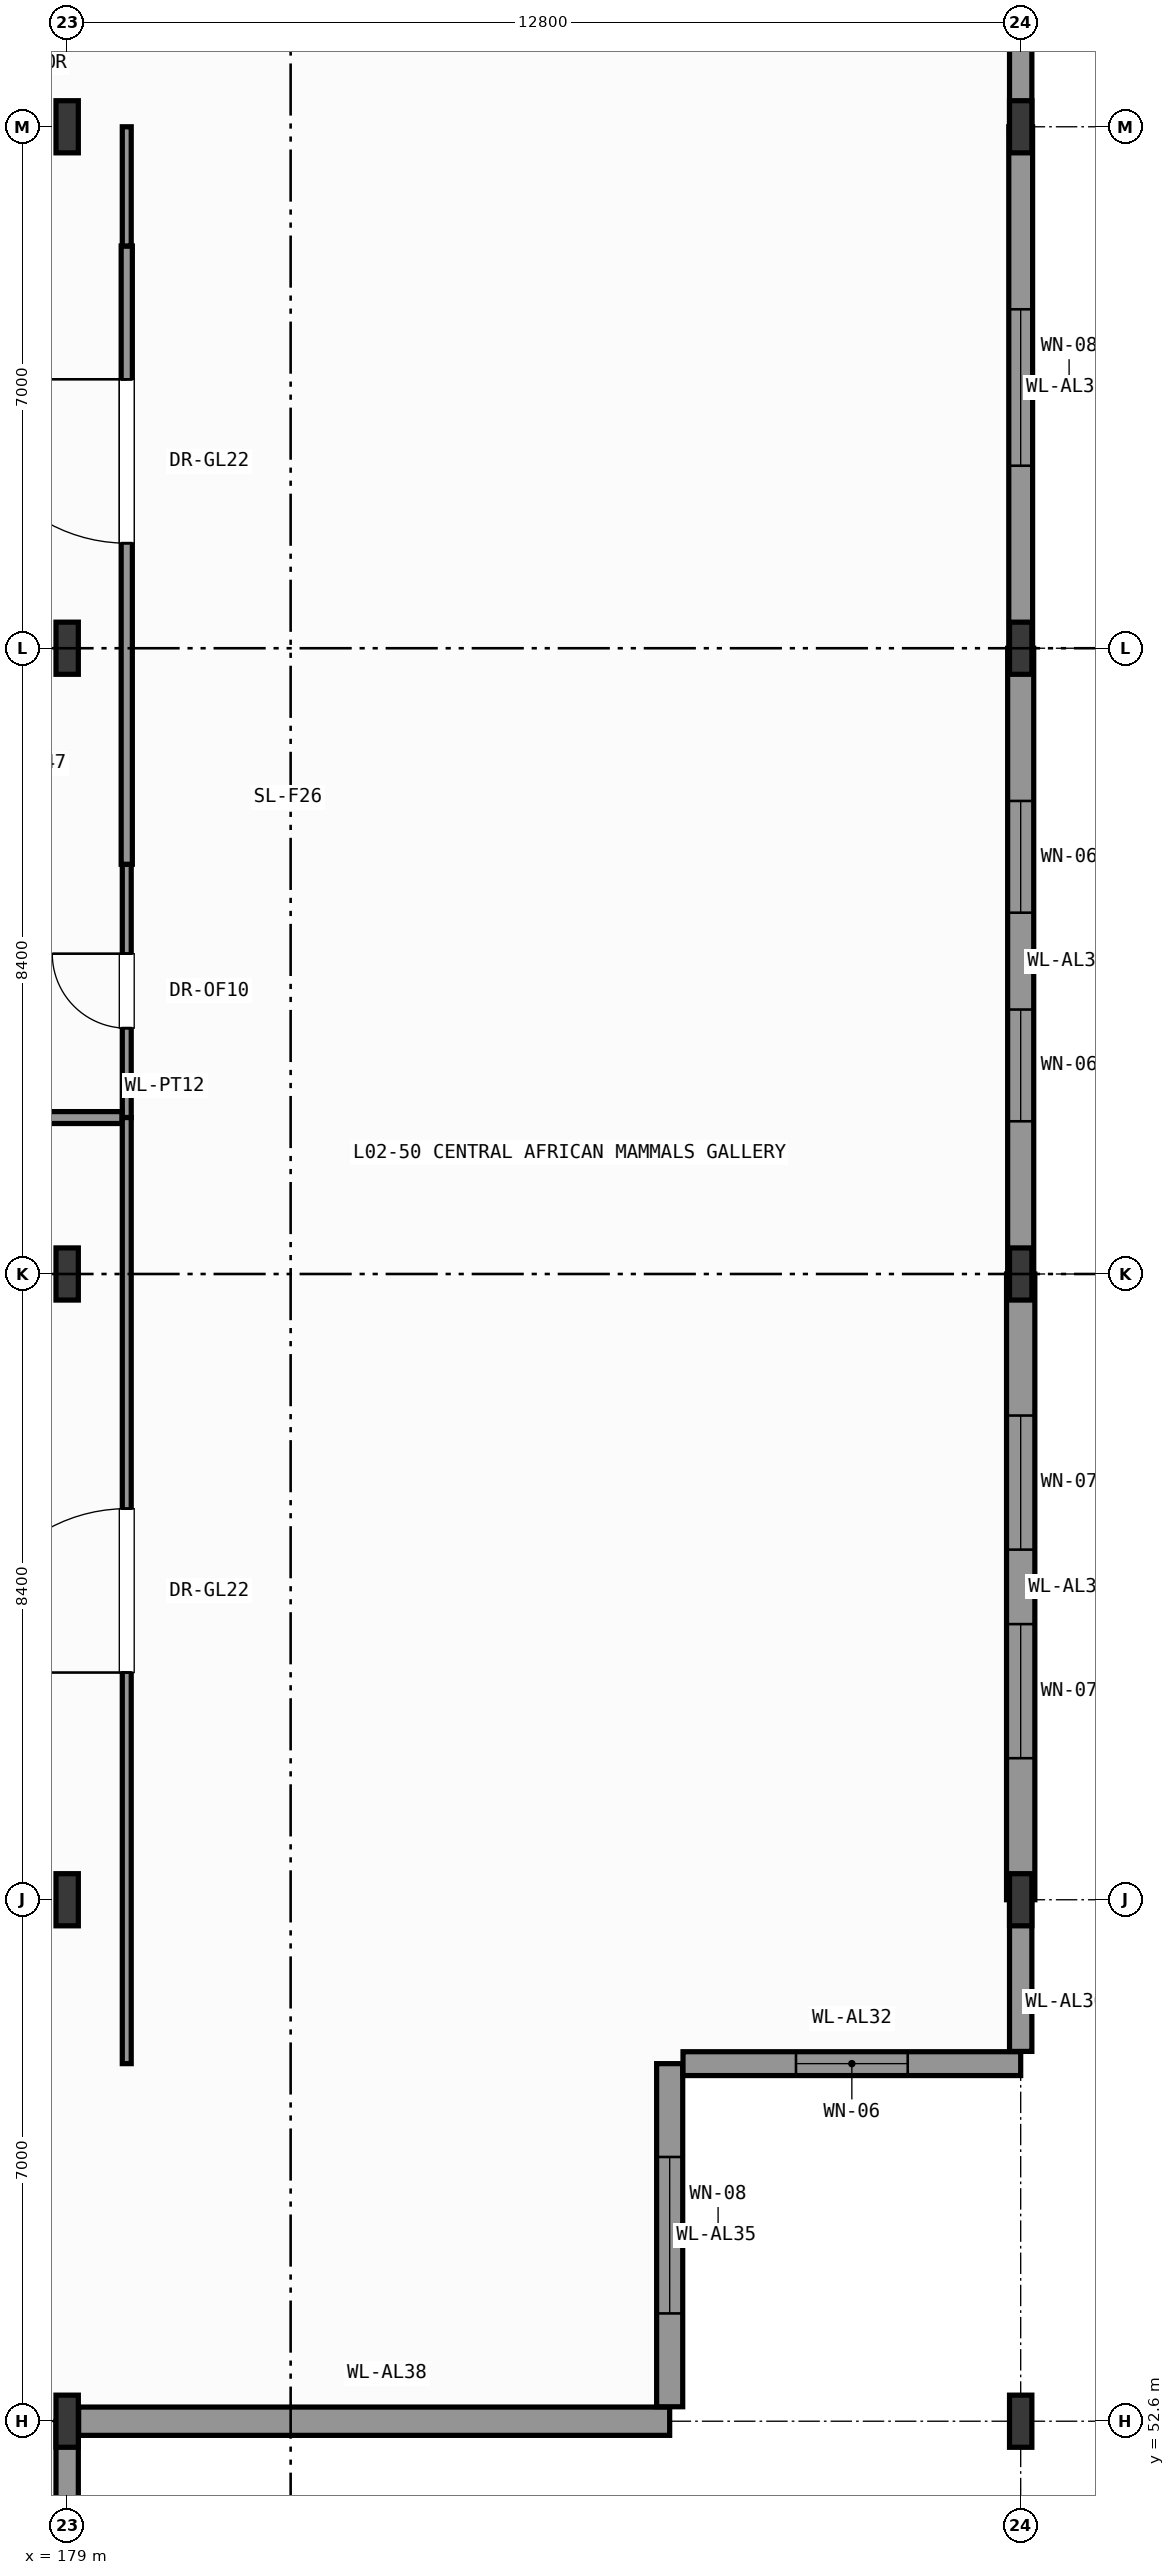
"""IFC4 building model, lengths in metres.
Left out: names, types, materials, properties, quantities, classifications, styles, units other than length and angle.
Written with IfcOpenShell. Run it as: python <this file> out.ifc"""

import sys

from ifc_helpers import new_model, si_unit, direction, frame, frame_2d, origin, origin_2d, place, context, subcontext, project, spatial, rectangle, i_section, extrude, element, fill, save


model = new_model("IFC4")
c1 = context("Model", 3, precision=1e-05, world=origin(), true_north=direction((0.0, 1.0)))
c2 = subcontext(c1, "Body", "Model", "MODEL_VIEW")
j1 = project(units=[si_unit("LENGTHUNIT", "METRE"), si_unit("PLANEANGLEUNIT", "RADIAN")], contexts=[c1])
p1 = place(None, origin())
s1 = spatial("IfcSite", under=j1, at=p1, CompositionType="ELEMENT")
p2 = place(p1, origin())
s2 = spatial("IfcBuilding", under=s1, at=p2, CompositionType="ELEMENT")
p3 = place(p2, frame((0.0, 0.0, 7.8)))
s3 = spatial("IfcBuildingStorey", under=s2, at=p3, CompositionType="ELEMENT", Elevation=7.8)
for number, where, z_axis, x_axis in (
    (1, (179.0, 52.6, 0.0), (0.0, 0.0, 1.0), (1.0, 0.0, 0.0)),
    (2, (179.0, 59.6, 0.0), (0.0, 0.0, 1.0), (1.0, 0.0, 0.0)),
    (3, (179.0, 68.0, 0.0), (0.0, 0.0, 1.0), (1.0, 0.0, 0.0)),
    (4, (179.0, 76.4, 0.0), (0.0, 0.0, 1.0), (1.0, 0.0, 0.0)),
    (5, (179.0, 83.4, 0.0), (0.0, 0.0, 1.0), (1.0, 0.0, 0.0)),
    (6, (191.8, 52.6, 0.0), (0.0, 0.0, 1.0), (1.0, 0.0, 0.0)),
    (7, (191.8, 59.6, 0.0), (0.0, 0.0, 1.0), (1.0, 0.0, 0.0)),
    (8, (191.8, 68.0, 0.0), (0.0, 0.0, 1.0), (1.0, 0.0, 0.0)),
    (9, (191.8, 76.4, 0.0), (0.0, 0.0, 1.0), (1.0, 0.0, 0.0)),
    (10, (191.8, 83.4, 0.0), (0.0, 0.0, 1.0), (1.0, 0.0, 0.0)),
):
    element("IfcColumn", number, at=place(p3, frame(where, z_axis=z_axis, x_axis=x_axis)), inside=s3, PredefinedType="COLUMN", context=c2, shape_type="SweptSolid", body=[
        extrude(i_section(OverallWidth=0.3, OverallDepth=0.7, WebThickness=0.017, FlangeThickness=0.032, FilletRadius=0.027, at=origin_2d()), origin(), (0.0, 0.0, 1.0), 5.4),
    ])
p4 = place(p3, frame((179.0, 52.6, 0.0), z_axis=(0.0, 0.0, 1.0), x_axis=(0.0, -1.0, 0.0)))
e11 = element("IfcWall", 11, at=p4, inside=s3, PredefinedType="SOLIDWALL", context=c2, shape_type="SweptSolid", body=[
    extrude(rectangle(XDim=7.0, YDim=0.3, at=frame_2d((3.5, 0.0))), origin(), (0.0, 0.0, 1.0), 4.605),
])
p5 = place(p4, frame((1.583, 0.0, 0.95)))
e12 = element("IfcOpeningElement", 12, at=p5, cuts=e11, PredefinedType="OPENING", context=c2, shape_type="SweptSolid", body=[
    extrude(rectangle(XDim=1.5, YDim=2.4, at=frame_2d((0.75, 1.2))), frame((0.0, 0.16, 0.0), z_axis=(0.0, -1.0, 0.0), x_axis=(1.0, 0.0, 0.0)), (0.0, 0.0, 1.0), 0.32),
])
p6 = place(p4, frame((3.917, 0.0, 0.95)))
e13 = element("IfcOpeningElement", 13, at=p6, cuts=e11, PredefinedType="OPENING", context=c2, shape_type="SweptSolid", body=[
    extrude(rectangle(XDim=1.5, YDim=2.4, at=frame_2d((0.75, 1.2))), frame((0.0, 0.16, 0.0), z_axis=(0.0, -1.0, 0.0), x_axis=(1.0, 0.0, 0.0)), (0.0, 0.0, 1.0), 0.32),
])
p7 = place(p3, frame((187.088, 52.6, 0.0), z_axis=(0.0, 0.0, 1.0), x_axis=(-1.0, 0.0, 0.0)))
e14 = element("IfcWall", 14, at=p7, inside=s3, PredefinedType="SOLIDWALL", context=c2, shape_type="SweptSolid", body=[
    extrude(rectangle(XDim=7.934, YDim=0.38, at=frame_2d((3.967, 0.0))), origin(), (0.0, 0.0, 1.0), 3.705),
])
p8 = place(p3, frame((187.088, 57.4, 0.0), z_axis=(0.0, 0.0, 1.0), x_axis=(0.0, -1.0, 0.0)))
e15 = element("IfcWall", 15, at=p8, inside=s3, PredefinedType="SOLIDWALL", context=c2, shape_type="SweptSolid", body=[
    extrude(rectangle(XDim=4.606, YDim=0.35, at=frame_2d((2.303, 0.0))), origin(), (0.0, 0.0, 1.0), 5.15),
])
p9 = place(p8, frame((1.253, 0.0, 0.95)))
e16 = element("IfcOpeningElement", 16, at=p9, cuts=e15, PredefinedType="OPENING", context=c2, shape_type="SweptSolid", body=[
    extrude(rectangle(XDim=2.1, YDim=2.8, at=frame_2d((1.05, 1.4))), frame((0.0, 0.185, 0.0), z_axis=(0.0, -1.0, 0.0), x_axis=(1.0, 0.0, 0.0)), (0.0, 0.0, 1.0), 0.37),
])
p10 = place(p3, frame((191.8, 57.4, 0.0), z_axis=(0.0, 0.0, 1.0), x_axis=(-1.0, 0.0, 0.0)))
e17 = element("IfcWall", 17, at=p10, inside=s3, PredefinedType="SOLIDWALL", context=c2, shape_type="SweptSolid", body=[
    extrude(rectangle(XDim=4.533, YDim=0.32, at=frame_2d((2.267, 0.0))), origin(), (0.0, 0.0, 1.0), 5.15),
])
p11 = place(p10, frame((1.517, 0.0, 0.95)))
e18 = element("IfcOpeningElement", 18, at=p11, cuts=e17, PredefinedType="OPENING", context=c2, shape_type="SweptSolid", body=[
    extrude(rectangle(XDim=1.5, YDim=2.4, at=frame_2d((0.75, 1.2))), frame((0.0, 0.17, 0.0), z_axis=(0.0, -1.0, 0.0), x_axis=(1.0, 0.0, 0.0)), (0.0, 0.0, 1.0), 0.34),
])
p12 = place(p3, frame((191.8, 59.6, 0.0), z_axis=(0.0, 0.0, 1.0), x_axis=(0.0, -1.0, 0.0)))
e19 = element("IfcWall", 19, at=p12, inside=s3, PredefinedType="SOLIDWALL", context=c2, shape_type="SweptSolid", body=[
    extrude(rectangle(XDim=2.036, YDim=0.3, at=frame_2d((1.018, 0.0))), origin(), (0.0, 0.0, 1.0), 4.815),
])
p13 = place(p3, frame((191.8, 68.0, 0.0), z_axis=(0.0, 0.0, 1.0), x_axis=(0.0, -1.0, 0.0)))
e20 = element("IfcWall", 20, at=p13, inside=s3, PredefinedType="SOLIDWALL", context=c2, shape_type="SweptSolid", body=[
    extrude(rectangle(XDim=8.4, YDim=0.38, at=frame_2d((4.2, 0.0))), origin(), (0.0, 0.0, 1.0), 4.665),
])
p14 = place(p13, frame((1.9, 0.0, 0.95)))
e21 = element("IfcOpeningElement", 21, at=p14, cuts=e20, PredefinedType="OPENING", context=c2, shape_type="SweptSolid", body=[
    extrude(rectangle(XDim=1.8, YDim=2.6, at=frame_2d((0.9, 1.3))), frame((0.0, 0.2, 0.0), z_axis=(0.0, -1.0, 0.0), x_axis=(1.0, 0.0, 0.0)), (0.0, 0.0, 1.0), 0.4),
])
p15 = place(p13, frame((4.7, 0.0, 0.95)))
e22 = element("IfcOpeningElement", 22, at=p15, cuts=e20, PredefinedType="OPENING", context=c2, shape_type="SweptSolid", body=[
    extrude(rectangle(XDim=1.8, YDim=2.6, at=frame_2d((0.9, 1.3))), frame((0.0, 0.2, 0.0), z_axis=(0.0, -1.0, 0.0), x_axis=(1.0, 0.0, 0.0)), (0.0, 0.0, 1.0), 0.4),
])
p16 = place(p3, frame((191.8, 76.4, 0.0), z_axis=(0.0, 0.0, 1.0), x_axis=(0.0, -1.0, 0.0)))
e23 = element("IfcWall", 23, at=p16, inside=s3, PredefinedType="SOLIDWALL", context=c2, shape_type="SweptSolid", body=[
    extrude(rectangle(XDim=8.4, YDim=0.35, at=frame_2d((4.2, 0.0))), origin(), (0.0, 0.0, 1.0), 4.665),
])
p17 = place(p16, frame((2.05, 0.0, 0.95)))
e24 = element("IfcOpeningElement", 24, at=p17, cuts=e23, PredefinedType="OPENING", context=c2, shape_type="SweptSolid", body=[
    extrude(rectangle(XDim=1.5, YDim=2.4, at=frame_2d((0.75, 1.2))), frame((0.0, 0.185, 0.0), z_axis=(0.0, -1.0, 0.0), x_axis=(1.0, 0.0, 0.0)), (0.0, 0.0, 1.0), 0.37),
])
p18 = place(p16, frame((4.85, 0.0, 0.95)))
e25 = element("IfcOpeningElement", 25, at=p18, cuts=e23, PredefinedType="OPENING", context=c2, shape_type="SweptSolid", body=[
    extrude(rectangle(XDim=1.5, YDim=2.4, at=frame_2d((0.75, 1.2))), frame((0.0, 0.185, 0.0), z_axis=(0.0, -1.0, 0.0), x_axis=(1.0, 0.0, 0.0)), (0.0, 0.0, 1.0), 0.37),
])
p19 = place(p3, frame((191.8, 83.4, 0.0), z_axis=(0.0, 0.0, 1.0), x_axis=(0.0, -1.0, 0.0)))
e26 = element("IfcWall", 26, at=p19, inside=s3, PredefinedType="SOLIDWALL", context=c2, shape_type="SweptSolid", body=[
    extrude(rectangle(XDim=7.0, YDim=0.32, at=frame_2d((3.5, 0.0))), origin(), (0.0, 0.0, 1.0), 4.815),
])
p20 = place(p19, frame((2.45, 0.0, 0.95)))
e27 = element("IfcOpeningElement", 27, at=p20, cuts=e26, PredefinedType="OPENING", context=c2, shape_type="SweptSolid", body=[
    extrude(rectangle(XDim=2.1, YDim=2.8, at=frame_2d((1.05, 1.4))), frame((0.0, 0.17, 0.0), z_axis=(0.0, -1.0, 0.0), x_axis=(1.0, 0.0, 0.0)), (0.0, 0.0, 1.0), 0.34),
])
p21 = place(p3, frame((191.8, 90.4, 0.0), z_axis=(0.0, 0.0, 1.0), x_axis=(0.0, -1.0, 0.0)))
e28 = element("IfcWall", 28, at=p21, inside=s3, PredefinedType="SOLIDWALL", context=c2, shape_type="SweptSolid", body=[
    extrude(rectangle(XDim=7.0, YDim=0.3, at=frame_2d((3.5, 0.0))), origin(), (0.0, 0.0, 1.0), 4.815),
])
p22 = place(p21, frame((1.583, 0.0, 0.95)))
e29 = element("IfcOpeningElement", 29, at=p22, cuts=e28, PredefinedType="OPENING", context=c2, shape_type="SweptSolid", body=[
    extrude(rectangle(XDim=1.5, YDim=2.4, at=frame_2d((0.75, 1.2))), frame((0.0, 0.16, 0.0), z_axis=(0.0, -1.0, 0.0), x_axis=(1.0, 0.0, 0.0)), (0.0, 0.0, 1.0), 0.32),
])
p23 = place(p21, frame((3.917, 0.0, 0.95)))
e30 = element("IfcOpeningElement", 30, at=p23, cuts=e28, PredefinedType="OPENING", context=c2, shape_type="SweptSolid", body=[
    extrude(rectangle(XDim=1.5, YDim=2.4, at=frame_2d((0.75, 1.2))), frame((0.0, 0.16, 0.0), z_axis=(0.0, -1.0, 0.0), x_axis=(1.0, 0.0, 0.0)), (0.0, 0.0, 1.0), 0.32),
])
p24 = place(p3, frame((179.8, 70.1, 0.0), z_axis=(0.0, 0.0, 1.0), x_axis=(0.0, 1.0, 0.0)))
e31 = element("IfcWall", 31, at=p24, inside=s3, PredefinedType="PARTITIONING", context=c2, shape_type="SweptSolid", body=[
    extrude(rectangle(XDim=3.4, YDim=0.12, at=frame_2d((1.7, 0.0))), origin(), (0.0, 0.0, 1.0), 5.15),
])
p25 = place(p24, frame((1.2, 0.0, 0.0)))
e32 = element("IfcOpeningElement", 32, at=p25, cuts=e31, PredefinedType="OPENING", context=c2, shape_type="SweptSolid", body=[
    extrude(rectangle(XDim=1.0, YDim=2.15, at=frame_2d((0.5, 1.075))), frame((0.0, 0.07, 0.0), z_axis=(0.0, -1.0, 0.0), x_axis=(1.0, 0.0, 0.0)), (0.0, 0.0, 1.0), 0.14),
])
p26 = place(p3, frame((170.479, 70.1, 0.0), z_axis=(0.0, 0.0, 1.0), x_axis=(1.0, 0.0, 0.0)))
e33 = element("IfcWall", 33, at=p26, inside=s3, PredefinedType="PARTITIONING", context=c2, shape_type="SweptSolid", body=[
    extrude(rectangle(XDim=9.257, YDim=0.16, at=frame_2d((4.628, 0.0))), origin(), (0.0, 0.0, 1.0), 5.15),
])
p27 = place(p26, frame((3.529, 0.0, 0.0)))
e34 = element("IfcOpeningElement", 34, at=p27, cuts=e33, PredefinedType="OPENING", context=c2, shape_type="SweptSolid", body=[
    extrude(rectangle(XDim=2.2, YDim=2.6, at=frame_2d((1.1, 1.3))), frame((0.0, 0.09, 0.0), z_axis=(0.0, -1.0, 0.0), x_axis=(1.0, 0.0, 0.0)), (0.0, 0.0, 1.0), 0.18),
])
p28 = place(p3, frame((179.8, 73.5, 0.0), z_axis=(0.0, 0.0, 1.0), x_axis=(0.0, 1.0, 0.0)))
e35 = element("IfcWall", 35, at=p28, inside=s3, PredefinedType="PARTITIONING", context=c2, shape_type="SweptSolid", body=[
    extrude(rectangle(XDim=8.3, YDim=0.15, at=frame_2d((4.15, 0.0))), origin(), (0.0, 0.0, 1.0), 5.15),
])
p29 = place(p28, frame((4.31, 0.0, 0.0)))
e36 = element("IfcOpeningElement", 36, at=p29, cuts=e35, PredefinedType="OPENING", context=c2, shape_type="SweptSolid", body=[
    extrude(rectangle(XDim=2.2, YDim=2.6, at=frame_2d((1.1, 1.3))), frame((0.0, 0.085, 0.0), z_axis=(0.0, -1.0, 0.0), x_axis=(1.0, 0.0, 0.0)), (0.0, 0.0, 1.0), 0.17),
])
p30 = place(p3, frame((179.8, 81.8, 0.0), z_axis=(0.0, 0.0, 1.0), x_axis=(0.0, 1.0, 0.0)))
e37 = element("IfcWall", 37, at=p30, inside=s3, PredefinedType="PARTITIONING", context=c2, shape_type="SweptSolid", body=[
    extrude(rectangle(XDim=1.6, YDim=0.12, at=frame_2d((0.8, 0.0))), origin(), (0.0, 0.0, 1.0), 5.15),
])
p31 = place(p3, frame((179.8, 57.4, 0.0), z_axis=(0.0, 0.0, 1.0), x_axis=(0.0, 1.0, 0.0)))
e38 = element("IfcWall", 38, at=p31, inside=s3, PredefinedType="PARTITIONING", context=c2, shape_type="SweptSolid", body=[
    extrude(rectangle(XDim=12.7, YDim=0.12, at=frame_2d((6.35, 0.0))), origin(), (0.0, 0.0, 1.0), 5.15),
])
p32 = place(p31, frame((5.25, 0.0, 0.0)))
e39 = element("IfcOpeningElement", 39, at=p32, cuts=e38, PredefinedType="OPENING", context=c2, shape_type="SweptSolid", body=[
    extrude(rectangle(XDim=2.2, YDim=2.6, at=frame_2d((1.1, 1.3))), frame((0.0, 0.07, 0.0), z_axis=(0.0, -1.0, 0.0), x_axis=(1.0, 0.0, 0.0)), (0.0, 0.0, 1.0), 0.14),
])
p33 = place(p9, origin())
e40 = element("IfcWindow", 40, at=p33, inside=s3, PartitioningType="SINGLE_PANEL", PredefinedType="WINDOW", context=c2, shape_type="SweptSolid", body=[
    extrude(rectangle(XDim=2.1, YDim=2.8, at=frame_2d((1.05, 1.4))), frame((0.0, 0.03, 0.0), z_axis=(0.0, -1.0, 0.0), x_axis=(1.0, 0.0, 0.0)), (0.0, 0.0, 1.0), 0.06),
])
fill(e16, e40)
p34 = place(p11, origin())
e41 = element("IfcWindow", 41, at=p34, inside=s3, PartitioningType="SINGLE_PANEL", PredefinedType="WINDOW", context=c2, shape_type="SweptSolid", body=[
    extrude(rectangle(XDim=1.5, YDim=2.4, at=frame_2d((0.75, 1.2))), frame((0.0, 0.03, 0.0), z_axis=(0.0, -1.0, 0.0), x_axis=(1.0, 0.0, 0.0)), (0.0, 0.0, 1.0), 0.06),
])
fill(e18, e41)
p35 = place(p14, origin())
e42 = element("IfcWindow", 42, at=p35, inside=s3, PartitioningType="SINGLE_PANEL", PredefinedType="WINDOW", context=c2, shape_type="SweptSolid", body=[
    extrude(rectangle(XDim=1.8, YDim=2.6, at=frame_2d((0.9, 1.3))), frame((0.0, 0.03, 0.0), z_axis=(0.0, -1.0, 0.0), x_axis=(1.0, 0.0, 0.0)), (0.0, 0.0, 1.0), 0.06),
])
fill(e21, e42)
p36 = place(p15, origin())
e43 = element("IfcWindow", 43, at=p36, inside=s3, PartitioningType="SINGLE_PANEL", PredefinedType="WINDOW", context=c2, shape_type="SweptSolid", body=[
    extrude(rectangle(XDim=1.8, YDim=2.6, at=frame_2d((0.9, 1.3))), frame((0.0, 0.03, 0.0), z_axis=(0.0, -1.0, 0.0), x_axis=(1.0, 0.0, 0.0)), (0.0, 0.0, 1.0), 0.06),
])
fill(e22, e43)
p37 = place(p17, origin())
e44 = element("IfcWindow", 44, at=p37, inside=s3, PartitioningType="SINGLE_PANEL", PredefinedType="WINDOW", context=c2, shape_type="SweptSolid", body=[
    extrude(rectangle(XDim=1.5, YDim=2.4, at=frame_2d((0.75, 1.2))), frame((0.0, 0.03, 0.0), z_axis=(0.0, -1.0, 0.0), x_axis=(1.0, 0.0, 0.0)), (0.0, 0.0, 1.0), 0.06),
])
fill(e24, e44)
p38 = place(p18, origin())
e45 = element("IfcWindow", 45, at=p38, inside=s3, PartitioningType="SINGLE_PANEL", PredefinedType="WINDOW", context=c2, shape_type="SweptSolid", body=[
    extrude(rectangle(XDim=1.5, YDim=2.4, at=frame_2d((0.75, 1.2))), frame((0.0, 0.03, 0.0), z_axis=(0.0, -1.0, 0.0), x_axis=(1.0, 0.0, 0.0)), (0.0, 0.0, 1.0), 0.06),
])
fill(e25, e45)
p39 = place(p20, origin())
e46 = element("IfcWindow", 46, at=p39, inside=s3, PartitioningType="SINGLE_PANEL", PredefinedType="WINDOW", context=c2, shape_type="SweptSolid", body=[
    extrude(rectangle(XDim=2.1, YDim=2.8, at=frame_2d((1.05, 1.4))), frame((0.0, 0.03, 0.0), z_axis=(0.0, -1.0, 0.0), x_axis=(1.0, 0.0, 0.0)), (0.0, 0.0, 1.0), 0.06),
])
fill(e27, e46)
p40 = place(p25, origin())
e47 = element("IfcDoor", 47, at=p40, inside=s3, OperationType="SINGLE_SWING_RIGHT", PredefinedType="DOOR", context=c2, shape_type="SweptSolid", body=[
    extrude(rectangle(XDim=1.0, YDim=2.15, at=frame_2d((0.5, 1.075))), frame((0.0, 0.025, 0.0), z_axis=(0.0, -1.0, 0.0), x_axis=(1.0, 0.0, 0.0)), (0.0, 0.0, 1.0), 0.05),
])
fill(e32, e47)
p41 = place(p29, origin())
e48 = element("IfcDoor", 48, at=p41, inside=s3, OperationType="SINGLE_SWING_RIGHT", PredefinedType="DOOR", context=c2, shape_type="SweptSolid", body=[
    extrude(rectangle(XDim=2.2, YDim=2.6, at=frame_2d((1.1, 1.3))), frame((0.0, 0.025, 0.0), z_axis=(0.0, -1.0, 0.0), x_axis=(1.0, 0.0, 0.0)), (0.0, 0.0, 1.0), 0.05),
])
fill(e36, e48)
p42 = place(p32, origin())
e49 = element("IfcDoor", 49, at=p42, inside=s3, OperationType="SINGLE_SWING_LEFT", PredefinedType="DOOR", context=c2, shape_type="SweptSolid", body=[
    extrude(rectangle(XDim=2.2, YDim=2.6, at=frame_2d((1.1, 1.3))), frame((0.0, 0.025, 0.0), z_axis=(0.0, -1.0, 0.0), x_axis=(1.0, 0.0, 0.0)), (0.0, 0.0, 1.0), 0.05),
])
fill(e39, e49)
save(model, sys.argv[1])
